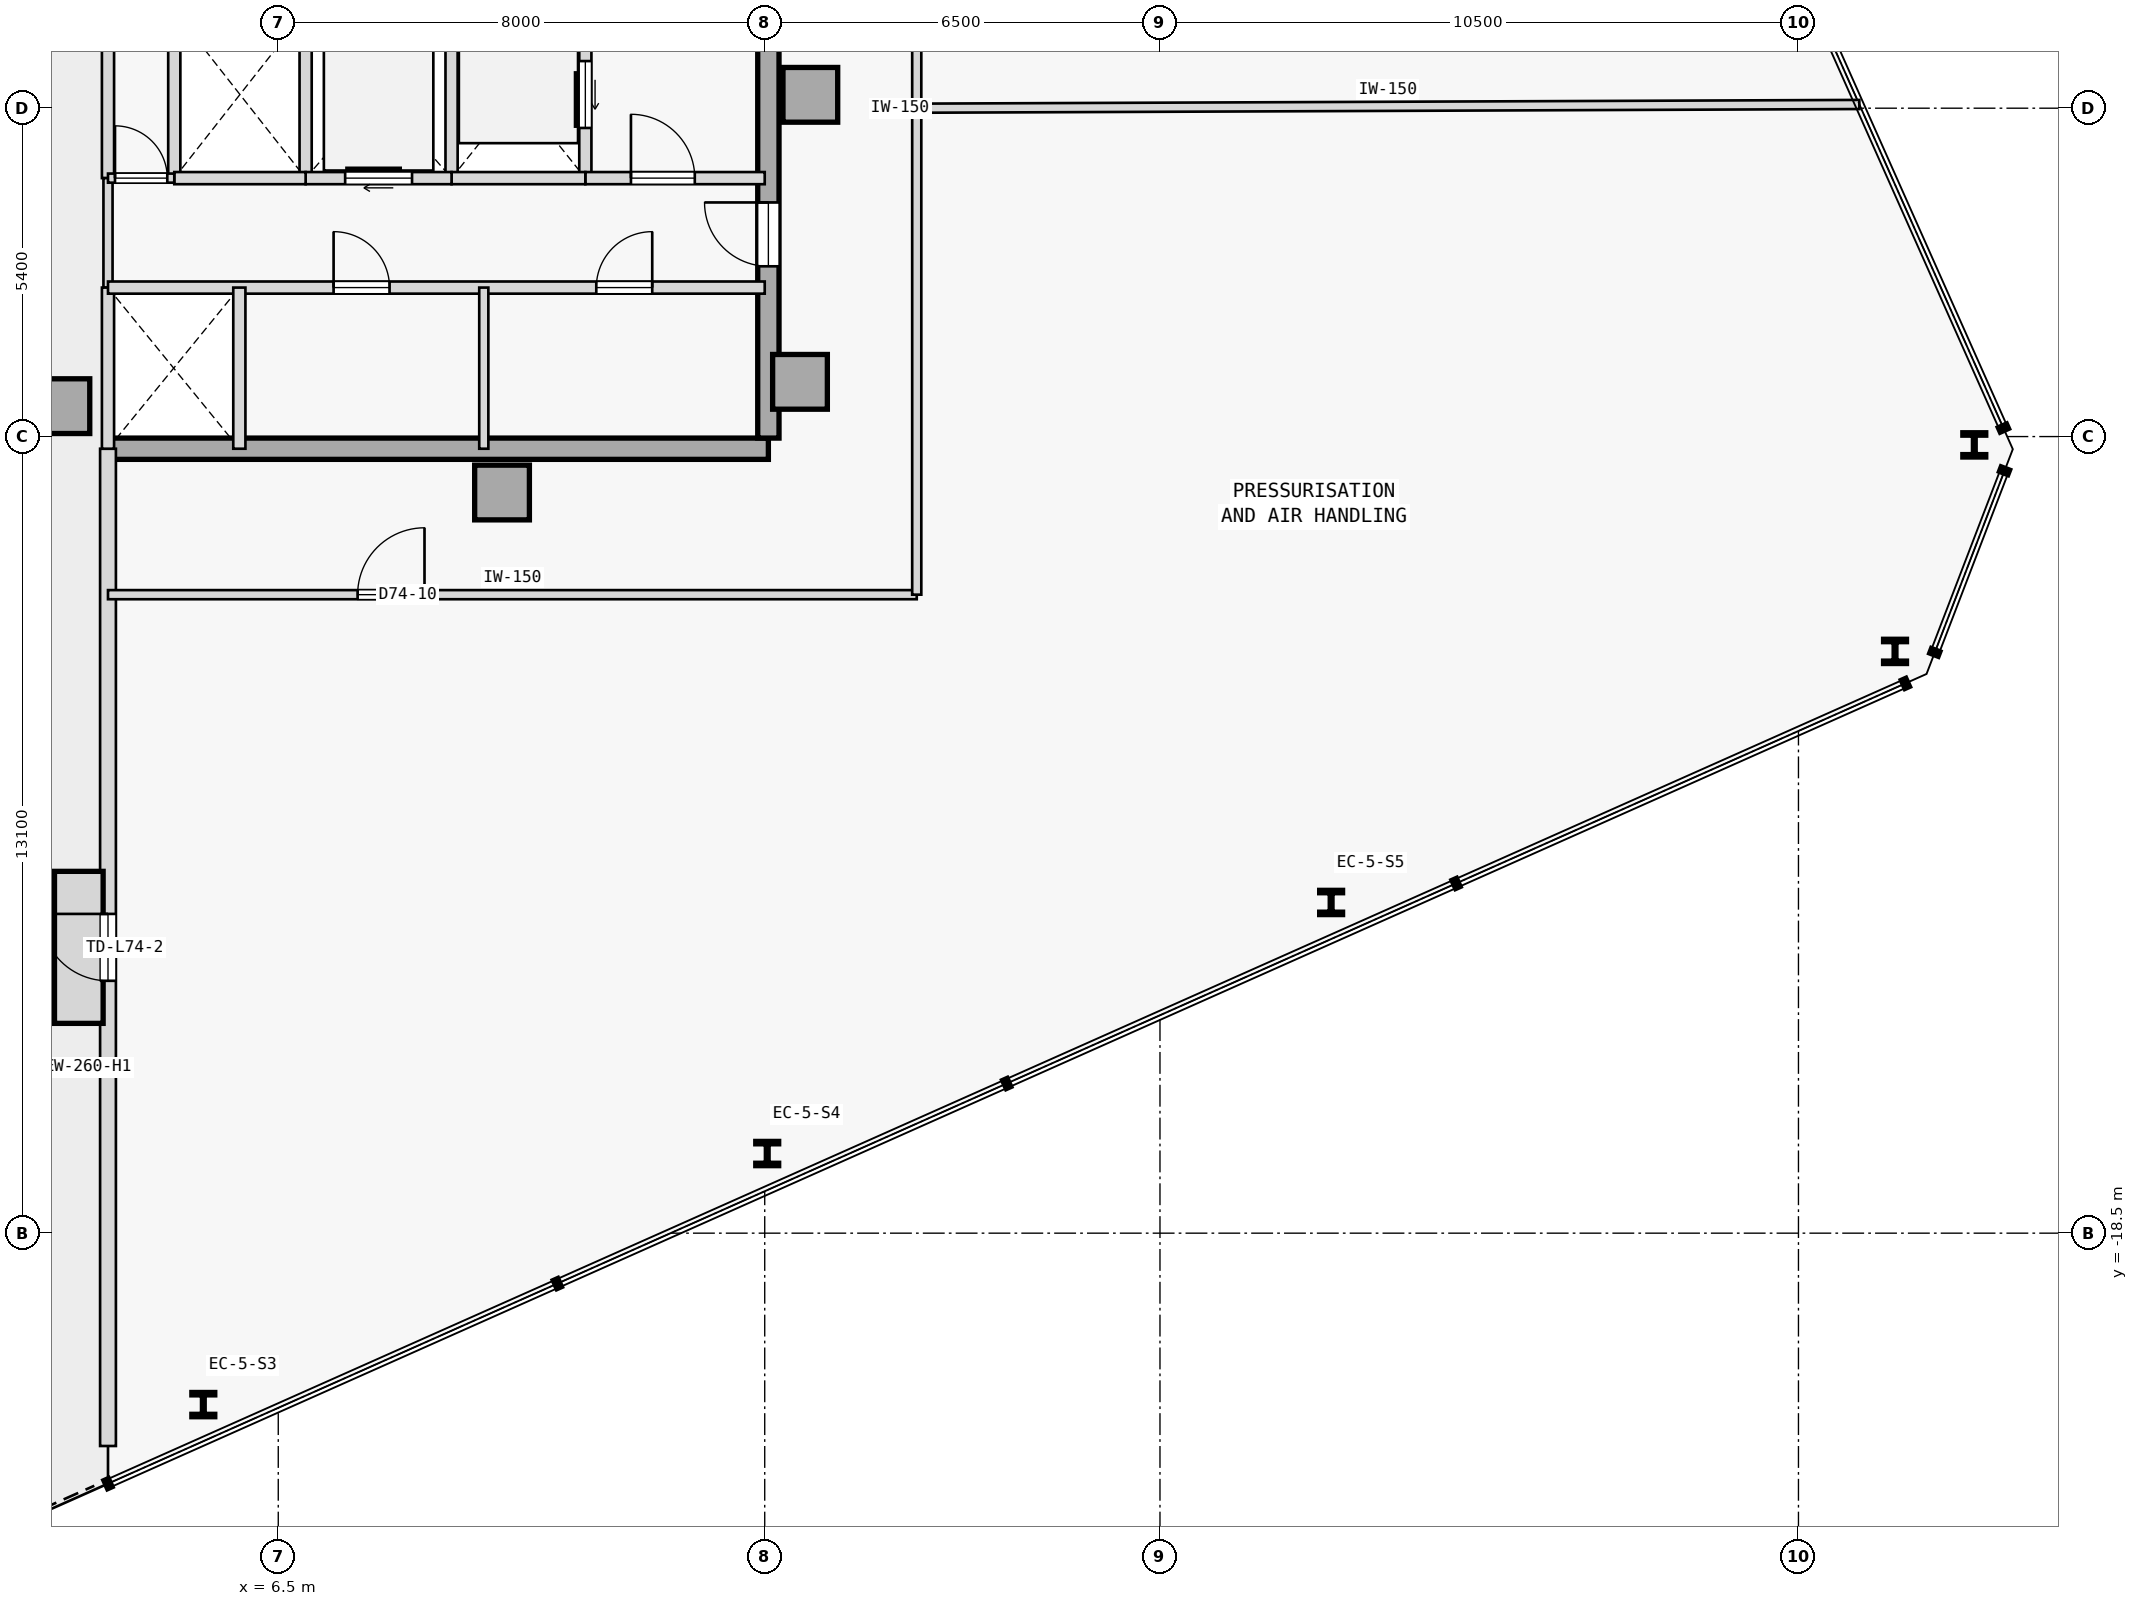
"""IFC4 building model, lengths in metres.
Left out: names, types, materials, properties, quantities, classifications, styles, units other than length and angle.
Written with IfcOpenShell. Run it as: python <this file> out.ifc"""

import sys

from ifc_helpers import new_model, si_unit, direction, frame, frame_2d, origin, origin_2d, place, context, subcontext, project, spatial, rectangle, i_section, extrude, element, fill, save


model = new_model("IFC4")
c1 = context("Model", 3, precision=1e-05, world=origin(), true_north=direction((0.0, 1.0)))
c2 = subcontext(c1, "Body", "Model", "MODEL_VIEW")
j1 = project(units=[si_unit("LENGTHUNIT", "METRE"), si_unit("PLANEANGLEUNIT", "RADIAN")], contexts=[c1])
p1 = place(None, origin())
s1 = spatial("IfcSite", under=j1, at=p1, CompositionType="ELEMENT")
p2 = place(p1, origin())
s2 = spatial("IfcBuilding", under=s1, at=p2, CompositionType="ELEMENT")
p3 = place(p2, frame((0.0, 0.0, 275.6)))
s3 = spatial("IfcBuildingStorey", under=s2, at=p3, CompositionType="ELEMENT", Elevation=275.6)
for number, where, z_axis, x_axis in (
    (1, (15.25, 0.22, 0.0), (0.0, 0.0, 1.0), (1.0, 0.0, 0.0)),
    (2, (15.08, -4.5, 0.0), (0.0, 0.0, 1.0), (1.0, 0.0, 0.0)),
    (3, (10.18, -6.32, 0.0), (0.0, 0.0, 1.0), (1.0, 0.0, 0.0)),
    (4, (2.95, -4.9, 0.0), (0.0, 0.0, 1.0), (1.0, 0.0, 0.0)),
):
    element("IfcColumn", number, at=place(p3, frame(where, z_axis=z_axis, x_axis=x_axis)), inside=s3, PredefinedType="COLUMN", context=c2, shape_type="SweptSolid", body=[
        extrude(rectangle(XDim=0.9, YDim=0.9, at=origin_2d()), origin(), (0.0, 0.0, 1.0), 6.3),
    ])
p4 = place(p3, frame((3.7, -5.6, 0.0), z_axis=(0.0, 0.0, 1.0), x_axis=(1.0, 0.0, 0.0)))
e5 = element("IfcWall", 5, at=p4, inside=s3, PredefinedType="SHEAR", context=c2, shape_type="SweptSolid", body=[
    extrude(rectangle(XDim=10.86, YDim=0.35, at=frame_2d((5.43, 0.0))), origin(), (0.0, 0.0, 1.0), 6.075),
])
p5 = place(p3, frame((14.56, -5.425, 0.0), z_axis=(0.0, 0.0, 1.0), x_axis=(0.0, 1.0, 0.0)))
e6 = element("IfcWall", 6, at=p5, inside=s3, PredefinedType="SHEAR", context=c2, shape_type="SweptSolid", body=[
    extrude(rectangle(XDim=10.85, YDim=0.35, at=frame_2d((5.425, 0.0))), origin(), (0.0, 0.0, 1.0), 6.075),
])
p6 = place(p5, frame((2.825, 0.0, 0.0)))
e7 = element("IfcOpeningElement", 7, at=p6, cuts=e6, PredefinedType="OPENING", context=c2, shape_type="SweptSolid", body=[
    extrude(rectangle(XDim=1.05, YDim=2.15, at=frame_2d((0.525, 1.075))), frame((0.0, 0.185, 0.0), z_axis=(0.0, -1.0, 0.0), x_axis=(1.0, 0.0, 0.0)), (0.0, 0.0, 1.0), 0.37),
])
for number, where, z_axis, x_axis in (
    (8, (5.268, -21.319, 0.0), (0.0, 0.0, 1.0), (1.0, 0.0, 0.0)),
    (9, (14.541, -17.19, 0.0), (0.0, 0.0, 1.0), (1.0, 0.0, 0.0)),
    (10, (23.814, -13.062, 0.0), (0.0, 0.0, 1.0), (1.0, 0.0, 0.0)),
    (11, (33.088, -8.933, 0.0), (0.0, 0.0, 1.0), (1.0, 0.0, 0.0)),
    (12, (34.392, -5.537, 0.0), (0.0, 0.0, 1.0), (1.0, 0.0, 0.0)),
):
    element("IfcColumn", number, at=place(p3, frame(where, z_axis=z_axis, x_axis=x_axis)), inside=s3, PredefinedType="COLUMN", context=c2, shape_type="SweptSolid", body=[
        extrude(i_section(OverallWidth=0.377, OverallDepth=0.399, WebThickness=0.025, FlangeThickness=0.04, FilletRadius=0.015, at=origin_2d()), origin(), (0.0, 0.0, 1.0), 6.3),
    ])
p7 = place(p3, frame((3.7, -22.0, 0.0), z_axis=(0.0, 0.0, 1.0), x_axis=(0.0, 1.0, 0.0)))
e13 = element("IfcWall", 13, at=p7, inside=s3, PredefinedType="STANDARD", context=c2, shape_type="SweptSolid", body=[
    extrude(rectangle(XDim=16.4, YDim=0.26, at=frame_2d((8.2, 0.0))), origin(), (0.0, 0.0, 1.0), 5.625),
])
p8 = place(p7, frame((7.65, 0.0, 0.0)))
e14 = element("IfcOpeningElement", 14, at=p8, cuts=e13, PredefinedType="OPENING", context=c2, shape_type="SweptSolid", body=[
    extrude(rectangle(XDim=1.1, YDim=2.2, at=frame_2d((0.55, 1.1))), frame((0.0, 0.14, 0.0), z_axis=(0.0, -1.0, 0.0), x_axis=(1.0, 0.0, 0.0)), (0.0, 0.0, 1.0), 0.28),
])
p9 = place(p3, frame((3.7, -1.15, 0.0), z_axis=(0.0, 0.0, 1.0), x_axis=(0.0, 1.0, 0.0)))
e15 = element("IfcWall", 15, at=p9, inside=s3, PredefinedType="STANDARD", context=c2, shape_type="SweptSolid", body=[
    extrude(rectangle(XDim=6.75, YDim=0.2, at=frame_2d((3.375, 0.0))), origin(), (0.0, 0.0, 1.0), 6.075),
])
p10 = place(p3, frame((3.7, -2.95, 0.0), z_axis=(0.0, 0.0, 1.0), x_axis=(0.0, 1.0, 0.0)))
e16 = element("IfcWall", 16, at=p10, inside=s3, PredefinedType="PARTITIONING", context=c2, shape_type="SweptSolid", body=[
    extrude(rectangle(XDim=1.8, YDim=0.15, at=frame_2d((0.9, 0.0))), origin(), (0.0, 0.0, 1.0), 6.075),
])
p11 = place(p3, frame((3.7, -5.6, 0.0), z_axis=(0.0, 0.0, 1.0), x_axis=(0.0, 1.0, 0.0)))
e17 = element("IfcWall", 17, at=p11, inside=s3, PredefinedType="STANDARD", context=c2, shape_type="SweptSolid", body=[
    extrude(rectangle(XDim=2.65, YDim=0.2, at=frame_2d((1.325, 0.0))), origin(), (0.0, 0.0, 1.0), 6.075),
])
p12 = place(p3, frame((11.55, -1.15, 0.0), z_axis=(0.0, 0.0, 1.0), x_axis=(0.0, 1.0, 0.0)))
e18 = element("IfcWall", 18, at=p12, inside=s3, PredefinedType="STANDARD", context=c2, shape_type="SweptSolid", body=[
    extrude(rectangle(XDim=2.75, YDim=0.2, at=frame_2d((1.375, 0.0))), origin(), (0.0, 0.0, 1.0), 6.075),
])
p13 = place(p12, frame((0.825, 0.0, 0.0)))
e19 = element("IfcOpeningElement", 19, at=p13, cuts=e18, PredefinedType="OPENING", context=c2, shape_type="SweptSolid", body=[
    extrude(rectangle(XDim=1.1, YDim=2.15, at=frame_2d((0.55, 1.075))), frame((0.0, 0.11, 0.0), z_axis=(0.0, -1.0, 0.0), x_axis=(1.0, 0.0, 0.0)), (0.0, 0.0, 1.0), 0.22),
])
p14 = place(p3, frame((9.35, -1.15, 0.0), z_axis=(0.0, 0.0, 1.0), x_axis=(0.0, 1.0, 0.0)))
e20 = element("IfcWall", 20, at=p14, inside=s3, PredefinedType="STANDARD", context=c2, shape_type="SweptSolid", body=[
    extrude(rectangle(XDim=2.75, YDim=0.2, at=frame_2d((1.375, 0.0))), origin(), (0.0, 0.0, 1.0), 6.075),
])
p15 = place(p3, frame((11.55, -1.15, 0.0), z_axis=(0.0, 0.0, 1.0), x_axis=(1.0, 0.0, 0.0)))
e21 = element("IfcWall", 21, at=p15, inside=s3, PredefinedType="STANDARD", context=c2, shape_type="SweptSolid", body=[
    extrude(rectangle(XDim=2.95, YDim=0.2, at=frame_2d((1.475, 0.0))), origin(), (0.0, 0.0, 1.0), 6.075),
])
p16 = place(p15, frame((0.75, 0.0, 0.0)))
e22 = element("IfcOpeningElement", 22, at=p16, cuts=e21, PredefinedType="OPENING", context=c2, shape_type="SweptSolid", body=[
    extrude(rectangle(XDim=1.05, YDim=2.18, at=frame_2d((0.525, 1.09))), frame((0.0, 0.11, 0.0), z_axis=(0.0, -1.0, 0.0), x_axis=(1.0, 0.0, 0.0)), (0.0, 0.0, 1.0), 0.22),
])
p17 = place(p3, frame((9.35, -1.15, 0.0), z_axis=(0.0, 0.0, 1.0), x_axis=(1.0, 0.0, 0.0)))
e23 = element("IfcWall", 23, at=p17, inside=s3, PredefinedType="STANDARD", context=c2, shape_type="SweptSolid", body=[
    extrude(rectangle(XDim=2.2, YDim=0.2, at=frame_2d((1.1, 0.0))), origin(), (0.0, 0.0, 1.0), 6.075),
])
p18 = place(p3, frame((6.95, -1.15, 0.0), z_axis=(0.0, 0.0, 1.0), x_axis=(0.0, 1.0, 0.0)))
e24 = element("IfcWall", 24, at=p18, inside=s3, PredefinedType="STANDARD", context=c2, shape_type="SweptSolid", body=[
    extrude(rectangle(XDim=2.75, YDim=0.2, at=frame_2d((1.375, 0.0))), origin(), (0.0, 0.0, 1.0), 6.075),
])
p19 = place(p3, frame((6.95, -1.15, 0.0), z_axis=(0.0, 0.0, 1.0), x_axis=(1.0, 0.0, 0.0)))
e25 = element("IfcWall", 25, at=p19, inside=s3, PredefinedType="STANDARD", context=c2, shape_type="SweptSolid", body=[
    extrude(rectangle(XDim=2.4, YDim=0.2, at=frame_2d((1.2, 0.0))), origin(), (0.0, 0.0, 1.0), 6.075),
])
p20 = place(p19, frame((0.65, 0.0, 0.0)))
e26 = element("IfcOpeningElement", 26, at=p20, cuts=e25, PredefinedType="OPENING", context=c2, shape_type="SweptSolid", body=[
    extrude(rectangle(XDim=1.1, YDim=2.15, at=frame_2d((0.55, 1.075))), frame((0.0, 0.11, 0.0), z_axis=(0.0, -1.0, 0.0), x_axis=(1.0, 0.0, 0.0)), (0.0, 0.0, 1.0), 0.22),
])
p21 = place(p3, frame((4.79, -1.15, 0.0), z_axis=(0.0, 0.0, 1.0), x_axis=(0.0, 1.0, 0.0)))
e27 = element("IfcWall", 27, at=p21, inside=s3, PredefinedType="STANDARD", context=c2, shape_type="SweptSolid", body=[
    extrude(rectangle(XDim=2.75, YDim=0.2, at=frame_2d((1.375, 0.0))), origin(), (0.0, 0.0, 1.0), 6.075),
])
p22 = place(p3, frame((4.79, -1.15, 0.0), z_axis=(0.0, 0.0, 1.0), x_axis=(1.0, 0.0, 0.0)))
e28 = element("IfcWall", 28, at=p22, inside=s3, PredefinedType="STANDARD", context=c2, shape_type="SweptSolid", body=[
    extrude(rectangle(XDim=2.16, YDim=0.2, at=frame_2d((1.08, 0.0))), origin(), (0.0, 0.0, 1.0), 6.075),
])
p23 = place(p3, frame((3.7, -1.15, 0.0), z_axis=(0.0, 0.0, 1.0), x_axis=(1.0, 0.0, 0.0)))
e29 = element("IfcWall", 29, at=p23, inside=s3, PredefinedType="PARTITIONING", context=c2, shape_type="SweptSolid", body=[
    extrude(rectangle(XDim=1.09, YDim=0.15, at=frame_2d((0.545, 0.0))), origin(), (0.0, 0.0, 1.0), 6.075),
])
p24 = place(p23, frame((0.115, 0.0, 0.0)))
e30 = element("IfcOpeningElement", 30, at=p24, cuts=e29, PredefinedType="OPENING", context=c2, shape_type="SweptSolid", body=[
    extrude(rectangle(XDim=0.86, YDim=2.15, at=frame_2d((0.43, 1.075))), frame((0.0, 0.085, 0.0), z_axis=(0.0, -1.0, 0.0), x_axis=(1.0, 0.0, 0.0)), (0.0, 0.0, 1.0), 0.17),
])
p25 = place(p3, frame((3.7, -2.95, 0.0), z_axis=(0.0, 0.0, 1.0), x_axis=(1.0, 0.0, 0.0)))
e31 = element("IfcWall", 31, at=p25, inside=s3, PredefinedType="STANDARD", context=c2, shape_type="SweptSolid", body=[
    extrude(rectangle(XDim=10.8, YDim=0.2, at=frame_2d((5.4, 0.0))), origin(), (0.0, 0.0, 1.0), 6.075),
])
p26 = place(p25, frame((3.71, 0.0, 0.0)))
e32 = element("IfcOpeningElement", 32, at=p26, cuts=e31, PredefinedType="OPENING", context=c2, shape_type="SweptSolid", body=[
    extrude(rectangle(XDim=0.92, YDim=2.15, at=frame_2d((0.46, 1.075))), frame((0.0, 0.11, 0.0), z_axis=(0.0, -1.0, 0.0), x_axis=(1.0, 0.0, 0.0)), (0.0, 0.0, 1.0), 0.22),
])
p27 = place(p25, frame((8.03, 0.0, 0.0)))
e33 = element("IfcOpeningElement", 33, at=p27, cuts=e31, PredefinedType="OPENING", context=c2, shape_type="SweptSolid", body=[
    extrude(rectangle(XDim=0.92, YDim=2.15, at=frame_2d((0.46, 1.075))), frame((0.0, 0.11, 0.0), z_axis=(0.0, -1.0, 0.0), x_axis=(1.0, 0.0, 0.0)), (0.0, 0.0, 1.0), 0.22),
])
p28 = place(p3, frame((5.86, -5.6, 0.0), z_axis=(0.0, 0.0, 1.0), x_axis=(0.0, 1.0, 0.0)))
e34 = element("IfcWall", 34, at=p28, inside=s3, PredefinedType="STANDARD", context=c2, shape_type="SweptSolid", body=[
    extrude(rectangle(XDim=2.65, YDim=0.2, at=frame_2d((1.325, 0.0))), origin(), (0.0, 0.0, 1.0), 6.075),
])
p29 = place(p3, frame((9.88, -5.6, 0.0), z_axis=(0.0, 0.0, 1.0), x_axis=(0.0, 1.0, 0.0)))
e35 = element("IfcWall", 35, at=p29, inside=s3, PredefinedType="PARTITIONING", context=c2, shape_type="SweptSolid", body=[
    extrude(rectangle(XDim=2.65, YDim=0.15, at=frame_2d((1.325, 0.0))), origin(), (0.0, 0.0, 1.0), 6.075),
])
p30 = place(p3, frame((17.0, 0.0, 0.0), z_axis=(0.0, 0.0, 1.0), x_axis=(0.0, 1.0, 0.0)))
e36 = element("IfcWall", 36, at=p30, inside=s3, PredefinedType="PARTITIONING", context=c2, shape_type="SweptSolid", body=[
    extrude(rectangle(XDim=8.0, YDim=0.15, at=frame_2d((4.0, 0.0))), origin(), (0.0, 0.0, 1.0), 6.075),
])
p31 = place(p3, frame((3.7, -8.0, 0.0), z_axis=(0.0, 0.0, 1.0), x_axis=(1.0, 0.0, 0.0)))
e37 = element("IfcWall", 37, at=p31, inside=s3, PredefinedType="PARTITIONING", context=c2, shape_type="SweptSolid", body=[
    extrude(rectangle(XDim=13.3, YDim=0.15, at=frame_2d((6.65, 0.0))), origin(), (0.0, 0.0, 1.0), 6.075),
])
p32 = place(p31, frame((4.105, 0.0, 0.0)))
e38 = element("IfcOpeningElement", 38, at=p32, cuts=e37, PredefinedType="OPENING", context=c2, shape_type="SweptSolid", body=[
    extrude(rectangle(XDim=1.1, YDim=2.15, at=frame_2d((0.55, 1.075))), frame((0.0, 0.085, 0.0), z_axis=(0.0, -1.0, 0.0), x_axis=(1.0, 0.0, 0.0)), (0.0, 0.0, 1.0), 0.17),
])
p33 = place(p3, frame((17.0, -8.0, 0.0), z_axis=(0.0, 0.0, 1.0), x_axis=(0.0, 1.0, 0.0)))
e39 = element("IfcWall", 39, at=p33, inside=s3, PredefinedType="PARTITIONING", context=c2, shape_type="SweptSolid", body=[
    extrude(rectangle(XDim=8.0, YDim=0.15, at=frame_2d((4.0, 0.0))), origin(), (0.0, 0.0, 1.0), 6.075),
])
p34 = place(p3, frame((17.0, 0.0, 0.0), z_axis=(0.0, 0.0, 1.0), x_axis=(0.999992186475, 0.003953098542, 0.0)))
e40 = element("IfcWall", 40, at=p34, inside=s3, PredefinedType="PARTITIONING", context=c2, shape_type="SweptSolid", body=[
    extrude(rectangle(XDim=15.501, YDim=0.15, at=frame_2d((7.751, 0.0))), origin(), (0.0, 0.0, 1.0), 6.075),
])
p35 = place(p8, origin())
e41 = element("IfcDoor", 41, at=p35, inside=s3, OperationType="SINGLE_SWING_RIGHT", PredefinedType="DOOR", context=c2, shape_type="SweptSolid", body=[
    extrude(rectangle(XDim=1.1, YDim=2.2, at=frame_2d((0.55, 1.1))), frame((0.0, 0.025, 0.0), z_axis=(0.0, -1.0, 0.0), x_axis=(1.0, 0.0, 0.0)), (0.0, 0.0, 1.0), 0.05),
])
fill(e14, e41)
p36 = place(p16, origin())
e42 = element("IfcDoor", 42, at=p36, inside=s3, OperationType="SINGLE_SWING_LEFT", PredefinedType="DOOR", context=c2, shape_type="SweptSolid", body=[
    extrude(rectangle(XDim=1.05, YDim=2.18, at=frame_2d((0.525, 1.09))), frame((0.0, 0.025, 0.0), z_axis=(0.0, -1.0, 0.0), x_axis=(1.0, 0.0, 0.0)), (0.0, 0.0, 1.0), 0.05),
])
fill(e22, e42)
p37 = place(p13, origin())
e43 = element("IfcDoor", 43, at=p37, inside=s3, OperationType="SLIDING_TO_RIGHT", PredefinedType="DOOR", context=c2, shape_type="SweptSolid", body=[
    extrude(rectangle(XDim=1.1, YDim=2.15, at=frame_2d((0.55, 1.075))), frame((0.0, 0.025, 0.0), z_axis=(0.0, -1.0, 0.0), x_axis=(1.0, 0.0, 0.0)), (0.0, 0.0, 1.0), 0.05),
])
fill(e19, e43)
p38 = place(p20, origin())
e44 = element("IfcDoor", 44, at=p38, inside=s3, OperationType="SLIDING_TO_RIGHT", PredefinedType="DOOR", context=c2, shape_type="SweptSolid", body=[
    extrude(rectangle(XDim=1.1, YDim=2.15, at=frame_2d((0.55, 1.075))), frame((0.0, 0.025, 0.0), z_axis=(0.0, -1.0, 0.0), x_axis=(1.0, 0.0, 0.0)), (0.0, 0.0, 1.0), 0.05),
])
fill(e26, e44)
p39 = place(p26, origin())
e45 = element("IfcDoor", 45, at=p39, inside=s3, OperationType="SINGLE_SWING_LEFT", PredefinedType="DOOR", context=c2, shape_type="SweptSolid", body=[
    extrude(rectangle(XDim=0.92, YDim=2.15, at=frame_2d((0.46, 1.075))), frame((0.0, 0.025, 0.0), z_axis=(0.0, -1.0, 0.0), x_axis=(1.0, 0.0, 0.0)), (0.0, 0.0, 1.0), 0.05),
])
fill(e32, e45)
p40 = place(p27, origin())
e46 = element("IfcDoor", 46, at=p40, inside=s3, OperationType="SINGLE_SWING_RIGHT", PredefinedType="DOOR", context=c2, shape_type="SweptSolid", body=[
    extrude(rectangle(XDim=0.92, YDim=2.15, at=frame_2d((0.46, 1.075))), frame((0.0, 0.025, 0.0), z_axis=(0.0, -1.0, 0.0), x_axis=(1.0, 0.0, 0.0)), (0.0, 0.0, 1.0), 0.05),
])
fill(e33, e46)
p41 = place(p24, origin())
e47 = element("IfcDoor", 47, at=p41, inside=s3, OperationType="SINGLE_SWING_LEFT", PredefinedType="DOOR", context=c2, shape_type="SweptSolid", body=[
    extrude(rectangle(XDim=0.86, YDim=2.15, at=frame_2d((0.43, 1.075))), frame((0.0, 0.025, 0.0), z_axis=(0.0, -1.0, 0.0), x_axis=(1.0, 0.0, 0.0)), (0.0, 0.0, 1.0), 0.05),
])
fill(e30, e47)
p42 = place(p32, origin())
e48 = element("IfcDoor", 48, at=p42, inside=s3, OperationType="SINGLE_SWING_RIGHT", PredefinedType="DOOR", context=c2, shape_type="SweptSolid", body=[
    extrude(rectangle(XDim=1.1, YDim=2.15, at=frame_2d((0.55, 1.075))), frame((0.0, 0.025, 0.0), z_axis=(0.0, -1.0, 0.0), x_axis=(1.0, 0.0, 0.0)), (0.0, 0.0, 1.0), 0.05),
])
fill(e38, e48)
p43 = place(p6, origin())
e49 = element("IfcDoor", 49, at=p43, inside=s3, OperationType="SINGLE_SWING_RIGHT", PredefinedType="DOOR", context=c2, shape_type="SweptSolid", body=[
    extrude(rectangle(XDim=1.05, YDim=2.15, at=frame_2d((0.525, 1.075))), frame((0.0, 0.025, 0.0), z_axis=(0.0, -1.0, 0.0), x_axis=(1.0, 0.0, 0.0)), (0.0, 0.0, 1.0), 0.05),
])
fill(e7, e49)
save(model, sys.argv[1])
